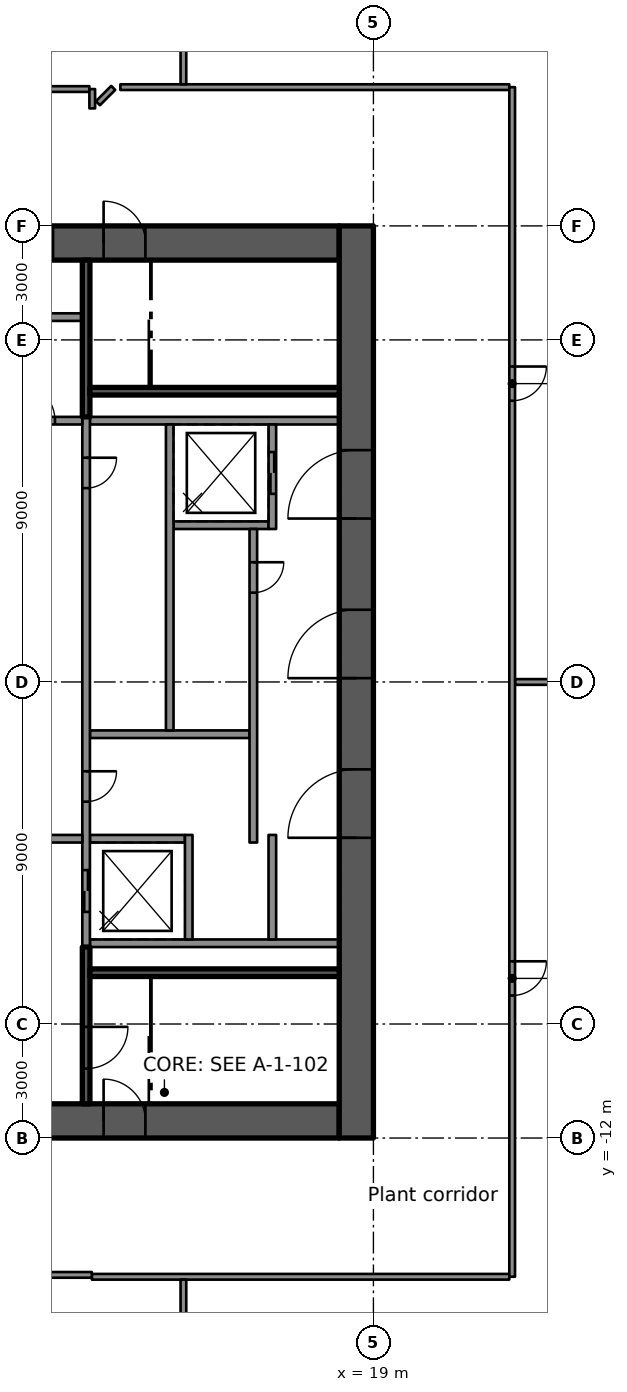
"""IFC4 building model, lengths in metres.
Left out: names, types, materials, properties, quantities, classifications, styles, units other than length and angle.
Written with IfcOpenShell. Run it as: python <this file> out.ifc"""

import sys

from ifc_helpers import new_model, si_unit, direction, frame, frame_2d, origin, place, context, subcontext, project, spatial, rectangle, extrude, element, fill, save


model = new_model("IFC4")
c1 = context("Model", 3, precision=1e-05, world=origin(), true_north=direction((0.0, 1.0)))
c2 = subcontext(c1, "Body", "Model", "MODEL_VIEW")
j1 = project(units=[si_unit("LENGTHUNIT", "METRE"), si_unit("PLANEANGLEUNIT", "RADIAN")], contexts=[c1])
p1 = place(None, origin())
s1 = spatial("IfcSite", under=j1, at=p1, CompositionType="ELEMENT")
p2 = place(p1, origin())
s2 = spatial("IfcBuilding", under=s1, at=p2, CompositionType="ELEMENT")
p3 = place(p2, frame((0.0, 0.0, 299.9)))
s3 = spatial("IfcBuildingStorey", under=s2, at=p3, CompositionType="ELEMENT", Elevation=299.9)
p4 = place(p3, frame((8.9, 11.55, 0.0), z_axis=(0.0, 0.0, 1.0), x_axis=(1.0, 0.0, 0.0)))
e1 = element("IfcWall", 1, at=p4, inside=s3, PredefinedType="SHEAR", context=c2, shape_type="SweptSolid", body=[
    extrude(rectangle(XDim=9.2, YDim=0.9, at=frame_2d((4.6, 0.0))), origin(), (0.0, 0.0, 1.0), 4.4),
])
p5 = place(p4, frame((3.0, 0.0, 0.0)))
e2 = element("IfcOpeningElement", 2, at=p5, cuts=e1, PredefinedType="OPENING", context=c2, shape_type="SweptSolid", body=[
    extrude(rectangle(XDim=1.1, YDim=2.1, at=frame_2d((0.55, 1.05))), frame((0.0, 0.46, 0.0), z_axis=(0.0, -1.0, 0.0), x_axis=(1.0, 0.0, 0.0)), (0.0, 0.0, 1.0), 0.92),
])
p6 = place(p4, frame((0.77, 0.0, 0.0)))
e3 = element("IfcOpeningElement", 3, at=p6, cuts=e1, PredefinedType="OPENING", context=c2, shape_type="SweptSolid", body=[
    extrude(rectangle(XDim=0.9, YDim=2.1, at=frame_2d((0.45, 1.05))), frame((0.0, 0.46, 0.0), z_axis=(0.0, -1.0, 0.0), x_axis=(1.0, 0.0, 0.0)), (0.0, 0.0, 1.0), 0.92),
])
p7 = place(p3, frame((8.9, -11.55, 0.0), z_axis=(0.0, 0.0, 1.0), x_axis=(1.0, 0.0, 0.0)))
e4 = element("IfcWall", 4, at=p7, inside=s3, PredefinedType="SHEAR", context=c2, shape_type="SweptSolid", body=[
    extrude(rectangle(XDim=9.2, YDim=0.9, at=frame_2d((4.6, 0.0))), origin(), (0.0, 0.0, 1.0), 4.4),
])
p8 = place(p7, frame((3.0, 0.0, 0.0)))
e5 = element("IfcOpeningElement", 5, at=p8, cuts=e4, PredefinedType="OPENING", context=c2, shape_type="SweptSolid", body=[
    extrude(rectangle(XDim=1.1, YDim=2.1, at=frame_2d((0.55, 1.05))), frame((0.0, 0.46, 0.0), z_axis=(0.0, -1.0, 0.0), x_axis=(1.0, 0.0, 0.0)), (0.0, 0.0, 1.0), 0.92),
])
p9 = place(p3, frame((18.55, -12.0, 0.0), z_axis=(0.0, 0.0, 1.0), x_axis=(0.0, 1.0, 0.0)))
e6 = element("IfcWall", 6, at=p9, inside=s3, PredefinedType="SHEAR", context=c2, shape_type="SweptSolid", body=[
    extrude(rectangle(XDim=24.0, YDim=0.9, at=frame_2d((12.0, 0.0))), origin(), (0.0, 0.0, 1.0), 4.4),
])
p10 = place(p9, frame((16.3, 0.0, 0.0)))
e7 = element("IfcOpeningElement", 7, at=p10, cuts=e6, PredefinedType="OPENING", context=c2, shape_type="SweptSolid", body=[
    extrude(rectangle(XDim=1.8, YDim=2.1, at=frame_2d((0.9, 1.05))), frame((0.0, 0.46, 0.0), z_axis=(0.0, -1.0, 0.0), x_axis=(1.0, 0.0, 0.0)), (0.0, 0.0, 1.0), 0.92),
])
p11 = place(p9, frame((12.1, 0.0, 0.0)))
e8 = element("IfcOpeningElement", 8, at=p11, cuts=e6, PredefinedType="OPENING", context=c2, shape_type="SweptSolid", body=[
    extrude(rectangle(XDim=1.8, YDim=2.1, at=frame_2d((0.9, 1.05))), frame((0.0, 0.46, 0.0), z_axis=(0.0, -1.0, 0.0), x_axis=(1.0, 0.0, 0.0)), (0.0, 0.0, 1.0), 0.92),
])
p12 = place(p9, frame((7.9, 0.0, 0.0)))
e9 = element("IfcOpeningElement", 9, at=p12, cuts=e6, PredefinedType="OPENING", context=c2, shape_type="SweptSolid", body=[
    extrude(rectangle(XDim=1.8, YDim=2.1, at=frame_2d((0.9, 1.05))), frame((0.0, 0.46, 0.0), z_axis=(0.0, -1.0, 0.0), x_axis=(1.0, 0.0, 0.0)), (0.0, 0.0, 1.0), 0.92),
])
for number, where, z_axis, x_axis in (
    (10, (11.54, -6.875, 0.0), (0.0, 0.0, 1.0), (1.0, 0.0, 0.0)),
    (11, (11.54, 6.875, 0.0), (0.0, 0.0, 1.0), (1.0, 0.0, 0.0)),
):
    element("IfcWall", number, at=place(p3, frame(where, z_axis=z_axis, x_axis=x_axis)), inside=s3, PredefinedType="SOLIDWALL", context=c2, shape_type="SweptSolid", body=[
        extrude(rectangle(XDim=6.56, YDim=0.2, at=frame_2d((3.28, 0.0))), origin(), (0.0, 0.0, 1.0), 3.98),
    ])
p13 = place(p3, frame((13.74, 4.125, 0.0), z_axis=(0.0, 0.0, 1.0), x_axis=(1.0, 0.0, 0.0)))
e12 = element("IfcWall", 12, at=p13, inside=s3, PredefinedType="SOLIDWALL", context=c2, shape_type="SweptSolid", body=[
    extrude(rectangle(XDim=2.5, YDim=0.2, at=frame_2d((1.25, 0.0))), origin(), (0.0, 0.0, 1.0), 3.98),
])
p14 = place(p3, frame((11.54, -1.375, 0.0), z_axis=(0.0, 0.0, 1.0), x_axis=(1.0, 0.0, 0.0)))
e13 = element("IfcWall", 13, at=p14, inside=s3, PredefinedType="SOLIDWALL", context=c2, shape_type="SweptSolid", body=[
    extrude(rectangle(XDim=4.2, YDim=0.2, at=frame_2d((2.1, 0.0))), origin(), (0.0, 0.0, 1.0), 3.98),
])
p15 = place(p3, frame((11.54, -4.125, 0.0), z_axis=(0.0, 0.0, 1.0), x_axis=(1.0, 0.0, 0.0)))
e14 = element("IfcWall", 14, at=p15, inside=s3, PredefinedType="SOLIDWALL", context=c2, shape_type="SweptSolid", body=[
    extrude(rectangle(XDim=2.5, YDim=0.2, at=frame_2d((1.25, 0.0))), origin(), (0.0, 0.0, 1.0), 3.98),
])
p16 = place(p3, frame((11.44, 6.975, 0.0), z_axis=(0.0, 0.0, 1.0), x_axis=(0.0, -1.0, 0.0)))
e15 = element("IfcWall", 15, at=p16, inside=s3, PredefinedType="SOLIDWALL", context=c2, shape_type="SweptSolid", body=[
    extrude(rectangle(XDim=13.95, YDim=0.2, at=frame_2d((6.975, 0.0))), origin(), (0.0, 0.0, 1.0), 3.98),
])
p17 = place(p16, frame((11.925, 0.0, 0.0)))
e16 = element("IfcOpeningElement", 16, at=p17, cuts=e15, PredefinedType="OPENING", context=c2, shape_type="SweptSolid", body=[
    extrude(rectangle(XDim=1.1, YDim=2.1, at=frame_2d((0.55, 1.05))), frame((0.0, 0.11, 0.0), z_axis=(0.0, -1.0, 0.0), x_axis=(1.0, 0.0, 0.0)), (0.0, 0.0, 1.0), 0.22),
])
p18 = place(p16, frame((1.075, 0.0, 0.0)))
e17 = element("IfcOpeningElement", 17, at=p18, cuts=e15, PredefinedType="OPENING", context=c2, shape_type="SweptSolid", body=[
    extrude(rectangle(XDim=0.8, YDim=2.1, at=frame_2d((0.4, 1.05))), frame((0.0, 0.11, 0.0), z_axis=(0.0, -1.0, 0.0), x_axis=(1.0, 0.0, 0.0)), (0.0, 0.0, 1.0), 0.22),
])
p19 = place(p16, frame((9.325, 0.0, 0.0)))
e18 = element("IfcOpeningElement", 18, at=p19, cuts=e15, PredefinedType="OPENING", context=c2, shape_type="SweptSolid", body=[
    extrude(rectangle(XDim=0.8, YDim=2.1, at=frame_2d((0.4, 1.05))), frame((0.0, 0.11, 0.0), z_axis=(0.0, -1.0, 0.0), x_axis=(1.0, 0.0, 0.0)), (0.0, 0.0, 1.0), 0.22),
])
p20 = place(p3, frame((13.64, 6.775, 0.0), z_axis=(0.0, 0.0, 1.0), x_axis=(0.0, -1.0, 0.0)))
e19 = element("IfcWall", 19, at=p20, inside=s3, PredefinedType="SOLIDWALL", context=c2, shape_type="SweptSolid", body=[
    extrude(rectangle(XDim=8.05, YDim=0.2, at=frame_2d((4.025, 0.0))), origin(), (0.0, 0.0, 1.0), 3.98),
])
p21 = place(p3, frame((14.14, -4.025, 0.0), z_axis=(0.0, 0.0, 1.0), x_axis=(0.0, -1.0, 0.0)))
e20 = element("IfcWall", 20, at=p21, inside=s3, PredefinedType="SOLIDWALL", context=c2, shape_type="SweptSolid", body=[
    extrude(rectangle(XDim=2.75, YDim=0.2, at=frame_2d((1.375, 0.0))), origin(), (0.0, 0.0, 1.0), 3.98),
])
p22 = place(p3, frame((16.34, 6.775, 0.0), z_axis=(0.0, 0.0, 1.0), x_axis=(0.0, -1.0, 0.0)))
e21 = element("IfcWall", 21, at=p22, inside=s3, PredefinedType="SOLIDWALL", context=c2, shape_type="SweptSolid", body=[
    extrude(rectangle(XDim=2.75, YDim=0.2, at=frame_2d((1.375, 0.0))), origin(), (0.0, 0.0, 1.0), 3.98),
])
p23 = place(p22, frame((0.725, 0.0, 0.0)))
e22 = element("IfcOpeningElement", 22, at=p23, cuts=e21, PredefinedType="OPENING", context=c2, shape_type="SweptSolid", body=[
    extrude(rectangle(XDim=1.1, YDim=2.1, at=frame_2d((0.55, 1.05))), frame((0.0, 0.11, 0.0), z_axis=(0.0, -1.0, 0.0), x_axis=(1.0, 0.0, 0.0)), (0.0, 0.0, 1.0), 0.22),
])
p24 = place(p3, frame((15.84, 4.025, 0.0), z_axis=(0.0, 0.0, 1.0), x_axis=(0.0, -1.0, 0.0)))
e23 = element("IfcWall", 23, at=p24, inside=s3, PredefinedType="SOLIDWALL", context=c2, shape_type="SweptSolid", body=[
    extrude(rectangle(XDim=8.25, YDim=0.2, at=frame_2d((4.125, 0.0))), origin(), (0.0, 0.0, 1.0), 3.98),
])
p25 = place(p24, frame((0.875, 0.0, 0.0)))
e24 = element("IfcOpeningElement", 24, at=p25, cuts=e23, PredefinedType="OPENING", context=c2, shape_type="SweptSolid", body=[
    extrude(rectangle(XDim=0.8, YDim=2.1, at=frame_2d((0.4, 1.05))), frame((0.0, 0.11, 0.0), z_axis=(0.0, -1.0, 0.0), x_axis=(1.0, 0.0, 0.0)), (0.0, 0.0, 1.0), 0.22),
])
p26 = place(p3, frame((16.34, -4.025, 0.0), z_axis=(0.0, 0.0, 1.0), x_axis=(0.0, -1.0, 0.0)))
e25 = element("IfcWall", 25, at=p26, inside=s3, PredefinedType="SOLIDWALL", context=c2, shape_type="SweptSolid", body=[
    extrude(rectangle(XDim=2.75, YDim=0.2, at=frame_2d((1.375, 0.0))), origin(), (0.0, 0.0, 1.0), 3.98),
])
p27 = place(p3, frame((11.44, -6.975, 0.0), z_axis=(0.0, 0.0, 1.0), x_axis=(0.0, -1.0, 0.0)))
e26 = element("IfcWall", 26, at=p27, inside=s3, PredefinedType="SOLIDWALL", context=c2, shape_type="SweptSolid", body=[
    extrude(rectangle(XDim=4.125, YDim=0.2, at=frame_2d((2.062, 0.0))), origin(), (0.0, 0.0, 1.0), 3.98),
])
p28 = place(p27, frame((2.1, 0.0, 0.0)))
e27 = element("IfcOpeningElement", 27, at=p28, cuts=e26, PredefinedType="OPENING", context=c2, shape_type="SweptSolid", body=[
    extrude(rectangle(XDim=1.1, YDim=2.1, at=frame_2d((0.55, 1.05))), frame((0.0, 0.11, 0.0), z_axis=(0.0, -1.0, 0.0), x_axis=(1.0, 0.0, 0.0)), (0.0, 0.0, 1.0), 0.22),
])
p29 = place(p3, frame((11.54, -7.65, 0.0), z_axis=(0.0, 0.0, 1.0), x_axis=(1.0, 0.0, 0.0)))
e28 = element("IfcWall", 28, at=p29, inside=s3, PredefinedType="SOLIDWALL", context=c2, shape_type="SweptSolid", body=[
    extrude(rectangle(XDim=6.56, YDim=0.2, at=frame_2d((3.28, 0.0))), origin(), (0.0, 0.0, 1.0), 3.98),
])
p30 = place(p3, frame((11.44, 11.1, 0.0), z_axis=(0.0, 0.0, 1.0), x_axis=(0.0, -1.0, 0.0)))
e29 = element("IfcWall", 29, at=p30, inside=s3, PredefinedType="SOLIDWALL", context=c2, shape_type="SweptSolid", body=[
    extrude(rectangle(XDim=4.125, YDim=0.2, at=frame_2d((2.062, 0.0))), origin(), (0.0, 0.0, 1.0), 3.98),
])
p31 = place(p3, frame((11.54, 7.65, 0.0), z_axis=(0.0, 0.0, 1.0), x_axis=(1.0, 0.0, 0.0)))
e30 = element("IfcWall", 30, at=p31, inside=s3, PredefinedType="SOLIDWALL", context=c2, shape_type="SweptSolid", body=[
    extrude(rectangle(XDim=6.56, YDim=0.2, at=frame_2d((3.28, 0.0))), origin(), (0.0, 0.0, 1.0), 3.98),
])
p32 = place(p3, frame((8.9, -4.125, 0.0), z_axis=(0.0, 0.0, 1.0), x_axis=(1.0, 0.0, 0.0)))
e31 = element("IfcWall", 31, at=p32, inside=s3, PredefinedType="PARTITIONING", context=c2, shape_type="SweptSolid", body=[
    extrude(rectangle(XDim=2.44, YDim=0.2, at=frame_2d((1.22, 0.0))), origin(), (0.0, 0.0, 1.0), 3.98),
])
p33 = place(p3, frame((8.9, 6.875, 0.0), z_axis=(0.0, 0.0, 1.0), x_axis=(1.0, 0.0, 0.0)))
e32 = element("IfcWall", 32, at=p33, inside=s3, PredefinedType="PARTITIONING", context=c2, shape_type="SweptSolid", body=[
    extrude(rectangle(XDim=2.44, YDim=0.2, at=frame_2d((1.22, 0.0))), origin(), (0.0, 0.0, 1.0), 3.98),
])
p34 = place(p33, frame((0.72, 0.0, 0.0)))
e33 = element("IfcOpeningElement", 33, at=p34, cuts=e32, PredefinedType="OPENING", context=c2, shape_type="SweptSolid", body=[
    extrude(rectangle(XDim=1.0, YDim=2.1, at=frame_2d((0.5, 1.05))), frame((0.0, 0.11, 0.0), z_axis=(0.0, -1.0, 0.0), x_axis=(1.0, 0.0, 0.0)), (0.0, 0.0, 1.0), 0.22),
])
p35 = place(p3, frame((8.9, 9.6, 0.0), z_axis=(0.0, 0.0, 1.0), x_axis=(1.0, 0.0, 0.0)))
e34 = element("IfcWall", 34, at=p35, inside=s3, PredefinedType="PARTITIONING", context=c2, shape_type="SweptSolid", body=[
    extrude(rectangle(XDim=2.44, YDim=0.2, at=frame_2d((1.22, 0.0))), origin(), (0.0, 0.0, 1.0), 3.98),
])
p36 = place(p3, frame((11.591, -15.651, 0.0), z_axis=(0.0, 0.0, 1.0), x_axis=(1.0, 0.0, 0.0)))
e35 = element("IfcWall", 35, at=p36, inside=s3, PredefinedType="PARTITIONING", context=c2, shape_type="SweptSolid", body=[
    extrude(rectangle(XDim=10.984, YDim=0.15, at=frame_2d((5.492, 0.0))), origin(), (0.0, 0.0, 1.0), 3.98),
])
p37 = place(p3, frame((4.425, -15.6, 0.0), z_axis=(0.0, 0.0, 1.0), x_axis=(0.999999990712, -0.000136295487, 0.0)))
e36 = element("IfcWall", 36, at=p37, inside=s3, PredefinedType="PARTITIONING", context=c2, shape_type="SweptSolid", body=[
    extrude(rectangle(XDim=7.165, YDim=0.15, at=frame_2d((3.583, 0.0))), origin(), (0.0, 0.0, 1.0), 3.98),
])
p38 = place(p3, frame((22.726, 0.0, 0.0), z_axis=(0.0, 0.0, 1.0), x_axis=(1.0, 0.0, 0.0)))
e37 = element("IfcWall", 37, at=p38, inside=s3, PredefinedType="PARTITIONING", context=c2, shape_type="SweptSolid", body=[
    extrude(rectangle(XDim=9.901, YDim=0.15, at=frame_2d((4.95, 0.0))), origin(), (0.0, 0.0, 1.0), 3.98),
])
p39 = place(p3, frame((4.425, 15.601, 0.0), z_axis=(0.0, 0.0, 1.0), x_axis=(1.0, 0.0, 0.0)))
e38 = element("IfcWall", 38, at=p39, inside=s3, PredefinedType="PARTITIONING", context=c2, shape_type="SweptSolid", body=[
    extrude(rectangle(XDim=7.1, YDim=0.15, at=frame_2d((3.55, 0.0))), origin(), (0.0, 0.0, 1.0), 3.98),
])
p40 = place(p39, frame((3.025, 0.0, 0.0)))
e39 = element("IfcOpeningElement", 39, at=p40, cuts=e38, PredefinedType="OPENING", context=c2, shape_type="SweptSolid", body=[
    extrude(rectangle(XDim=0.9, YDim=2.1, at=frame_2d((0.45, 1.05))), frame((0.0, 0.085, 0.0), z_axis=(0.0, -1.0, 0.0), x_axis=(1.0, 0.0, 0.0)), (0.0, 0.0, 1.0), 0.17),
])
p41 = place(p3, frame((12.341, 15.651, 0.0), z_axis=(0.0, 0.0, 1.0), x_axis=(1.0, 0.0, 0.0)))
e40 = element("IfcWall", 40, at=p41, inside=s3, PredefinedType="PARTITIONING", context=c2, shape_type="SweptSolid", body=[
    extrude(rectangle(XDim=10.234, YDim=0.15, at=frame_2d((5.117, 0.0))), origin(), (0.0, 0.0, 1.0), 3.98),
])
p42 = place(p3, frame((11.75, 15.228, 0.0), z_axis=(0.0, 0.0, 1.0), x_axis=(0.707106781187, 0.707106781187, 0.0)))
e41 = element("IfcWall", 41, at=p42, inside=s3, PredefinedType="PARTITIONING", context=c2, shape_type="SweptSolid", body=[
    extrude(rectangle(XDim=0.57, YDim=0.15, at=frame_2d((0.285, 0.0))), origin(), (0.0, 0.0, 1.0), 3.98),
])
p43 = place(p3, frame((22.651, 15.65, 0.0), z_axis=(0.0, 0.0, 1.0), x_axis=(0.0, -1.0, 0.0)))
e42 = element("IfcWall", 42, at=p43, inside=s3, PredefinedType="PARTITIONING", context=c2, shape_type="SweptSolid", body=[
    extrude(rectangle(XDim=31.3, YDim=0.15, at=frame_2d((15.65, 0.0))), origin(), (0.0, 0.0, 1.0), 3.98),
])
p44 = place(p43, frame((23.0, 0.0, 0.0)))
e43 = element("IfcOpeningElement", 43, at=p44, cuts=e42, PredefinedType="OPENING", context=c2, shape_type="SweptSolid", body=[
    extrude(rectangle(XDim=0.9, YDim=2.1, at=frame_2d((0.45, 1.05))), frame((0.0, 0.085, 0.0), z_axis=(0.0, -1.0, 0.0), x_axis=(1.0, 0.0, 0.0)), (0.0, 0.0, 1.0), 0.17),
])
p45 = place(p43, frame((7.35, 0.0, 0.0)))
e44 = element("IfcOpeningElement", 44, at=p45, cuts=e42, PredefinedType="OPENING", context=c2, shape_type="SweptSolid", body=[
    extrude(rectangle(XDim=0.9, YDim=2.1, at=frame_2d((0.45, 1.05))), frame((0.0, 0.085, 0.0), z_axis=(0.0, -1.0, 0.0), x_axis=(1.0, 0.0, 0.0)), (0.0, 0.0, 1.0), 0.17),
])
p46 = place(p3, frame((14.0, -26.92, 0.0), z_axis=(0.0, 0.0, 1.0), x_axis=(0.0, 1.0, 0.0)))
e45 = element("IfcWall", 45, at=p46, inside=s3, PredefinedType="PARTITIONING", context=c2, shape_type="SweptSolid", body=[
    extrude(rectangle(XDim=11.194, YDim=0.15, at=frame_2d((5.597, 0.0))), origin(), (0.0, 0.0, 1.0), 3.98),
])
p47 = place(p3, frame((14.0, 15.726, 0.0), z_axis=(0.0, 0.0, 1.0), x_axis=(0.0, 1.0, 0.0)))
e46 = element("IfcWall", 46, at=p47, inside=s3, PredefinedType="PARTITIONING", context=c2, shape_type="SweptSolid", body=[
    extrude(rectangle(XDim=11.244, YDim=0.15, at=frame_2d((5.622, 0.0))), origin(), (0.0, 0.0, 1.0), 3.98),
])
p48 = place(p3, frame((11.601, 15.092, 0.0), z_axis=(0.0, 0.0, 1.0), x_axis=(0.0, 1.0, 0.0)))
e47 = element("IfcWall", 47, at=p48, inside=s3, PredefinedType="PARTITIONING", context=c2, shape_type="SweptSolid", body=[
    extrude(rectangle(XDim=0.508, YDim=0.15, at=frame_2d((0.254, 0.0))), origin(), (0.0, 0.0, 1.0), 3.98),
])
p49 = place(p23, origin())
e48 = element("IfcDoor", 48, at=p49, inside=s3, OperationType="DOUBLE_DOOR_SLIDING", PredefinedType="DOOR", context=c2, shape_type="SweptSolid", body=[
    extrude(rectangle(XDim=1.1, YDim=2.1, at=frame_2d((0.55, 1.05))), frame((0.0, 0.025, 0.0), z_axis=(0.0, -1.0, 0.0), x_axis=(1.0, 0.0, 0.0)), (0.0, 0.0, 1.0), 0.05),
])
fill(e22, e48)
p50 = place(p17, origin())
e49 = element("IfcDoor", 49, at=p50, inside=s3, OperationType="DOUBLE_DOOR_SLIDING", PredefinedType="DOOR", context=c2, shape_type="SweptSolid", body=[
    extrude(rectangle(XDim=1.1, YDim=2.1, at=frame_2d((0.55, 1.05))), frame((0.0, 0.025, 0.0), z_axis=(0.0, -1.0, 0.0), x_axis=(1.0, 0.0, 0.0)), (0.0, 0.0, 1.0), 0.05),
])
fill(e16, e49)
p51 = place(p18, origin())
e50 = element("IfcDoor", 50, at=p51, inside=s3, OperationType="SINGLE_SWING_LEFT", PredefinedType="DOOR", context=c2, shape_type="SweptSolid", body=[
    extrude(rectangle(XDim=0.8, YDim=2.1, at=frame_2d((0.4, 1.05))), frame((0.0, 0.025, 0.0), z_axis=(0.0, -1.0, 0.0), x_axis=(1.0, 0.0, 0.0)), (0.0, 0.0, 1.0), 0.05),
])
fill(e17, e50)
p52 = place(p25, origin())
e51 = element("IfcDoor", 51, at=p52, inside=s3, OperationType="SINGLE_SWING_LEFT", PredefinedType="DOOR", context=c2, shape_type="SweptSolid", body=[
    extrude(rectangle(XDim=0.8, YDim=2.1, at=frame_2d((0.4, 1.05))), frame((0.0, 0.025, 0.0), z_axis=(0.0, -1.0, 0.0), x_axis=(1.0, 0.0, 0.0)), (0.0, 0.0, 1.0), 0.05),
])
fill(e24, e51)
p53 = place(p19, origin())
e52 = element("IfcDoor", 52, at=p53, inside=s3, OperationType="SINGLE_SWING_LEFT", PredefinedType="DOOR", context=c2, shape_type="SweptSolid", body=[
    extrude(rectangle(XDim=0.8, YDim=2.1, at=frame_2d((0.4, 1.05))), frame((0.0, 0.025, 0.0), z_axis=(0.0, -1.0, 0.0), x_axis=(1.0, 0.0, 0.0)), (0.0, 0.0, 1.0), 0.05),
])
fill(e18, e52)
p54 = place(p10, origin())
e53 = element("IfcDoor", 53, at=p54, inside=s3, OperationType="SINGLE_SWING_RIGHT", PredefinedType="DOOR", context=c2, shape_type="SweptSolid", body=[
    extrude(rectangle(XDim=1.8, YDim=2.1, at=frame_2d((0.9, 1.05))), frame((0.0, 0.025, 0.0), z_axis=(0.0, -1.0, 0.0), x_axis=(1.0, 0.0, 0.0)), (0.0, 0.0, 1.0), 0.05),
])
fill(e7, e53)
p55 = place(p11, origin())
e54 = element("IfcDoor", 54, at=p55, inside=s3, OperationType="SINGLE_SWING_RIGHT", PredefinedType="DOOR", context=c2, shape_type="SweptSolid", body=[
    extrude(rectangle(XDim=1.8, YDim=2.1, at=frame_2d((0.9, 1.05))), frame((0.0, 0.025, 0.0), z_axis=(0.0, -1.0, 0.0), x_axis=(1.0, 0.0, 0.0)), (0.0, 0.0, 1.0), 0.05),
])
fill(e8, e54)
p56 = place(p12, origin())
e55 = element("IfcDoor", 55, at=p56, inside=s3, OperationType="SINGLE_SWING_LEFT", PredefinedType="DOOR", context=c2, shape_type="SweptSolid", body=[
    extrude(rectangle(XDim=1.8, YDim=2.1, at=frame_2d((0.9, 1.05))), frame((0.0, 0.025, 0.0), z_axis=(0.0, -1.0, 0.0), x_axis=(1.0, 0.0, 0.0)), (0.0, 0.0, 1.0), 0.05),
])
fill(e9, e55)
p57 = place(p8, origin())
e56 = element("IfcDoor", 56, at=p57, inside=s3, OperationType="SINGLE_SWING_LEFT", PredefinedType="DOOR", context=c2, shape_type="SweptSolid", body=[
    extrude(rectangle(XDim=1.1, YDim=2.1, at=frame_2d((0.55, 1.05))), frame((0.0, 0.025, 0.0), z_axis=(0.0, -1.0, 0.0), x_axis=(1.0, 0.0, 0.0)), (0.0, 0.0, 1.0), 0.05),
])
fill(e5, e56)
p58 = place(p5, origin())
e57 = element("IfcDoor", 57, at=p58, inside=s3, OperationType="SINGLE_SWING_LEFT", PredefinedType="DOOR", context=c2, shape_type="SweptSolid", body=[
    extrude(rectangle(XDim=1.1, YDim=2.1, at=frame_2d((0.55, 1.05))), frame((0.0, 0.025, 0.0), z_axis=(0.0, -1.0, 0.0), x_axis=(1.0, 0.0, 0.0)), (0.0, 0.0, 1.0), 0.05),
])
fill(e2, e57)
p59 = place(p28, origin())
e58 = element("IfcDoor", 58, at=p59, inside=s3, OperationType="SINGLE_SWING_RIGHT", PredefinedType="DOOR", context=c2, shape_type="SweptSolid", body=[
    extrude(rectangle(XDim=1.1, YDim=2.1, at=frame_2d((0.55, 1.05))), frame((0.0, 0.025, 0.0), z_axis=(0.0, -1.0, 0.0), x_axis=(1.0, 0.0, 0.0)), (0.0, 0.0, 1.0), 0.05),
])
fill(e27, e58)
p60 = place(p6, origin())
e59 = element("IfcDoor", 59, at=p60, inside=s3, OperationType="SINGLE_SWING_LEFT", PredefinedType="DOOR", context=c2, shape_type="SweptSolid", body=[
    extrude(rectangle(XDim=0.9, YDim=2.1, at=frame_2d((0.45, 1.05))), frame((0.0, 0.025, 0.0), z_axis=(0.0, -1.0, 0.0), x_axis=(1.0, 0.0, 0.0)), (0.0, 0.0, 1.0), 0.05),
])
fill(e3, e59)
p61 = place(p34, origin())
e60 = element("IfcDoor", 60, at=p61, inside=s3, OperationType="SINGLE_SWING_RIGHT", PredefinedType="DOOR", context=c2, shape_type="SweptSolid", body=[
    extrude(rectangle(XDim=1.0, YDim=2.1, at=frame_2d((0.5, 1.05))), frame((0.0, 0.025, 0.0), z_axis=(0.0, -1.0, 0.0), x_axis=(1.0, 0.0, 0.0)), (0.0, 0.0, 1.0), 0.05),
])
fill(e33, e60)
p62 = place(p44, origin())
e61 = element("IfcDoor", 61, at=p62, inside=s3, OperationType="SINGLE_SWING_RIGHT", PredefinedType="DOOR", context=c2, shape_type="SweptSolid", body=[
    extrude(rectangle(XDim=0.9, YDim=2.1, at=frame_2d((0.45, 1.05))), frame((0.0, 0.025, 0.0), z_axis=(0.0, -1.0, 0.0), x_axis=(1.0, 0.0, 0.0)), (0.0, 0.0, 1.0), 0.05),
])
fill(e43, e61)
p63 = place(p45, origin())
e62 = element("IfcDoor", 62, at=p63, inside=s3, OperationType="SINGLE_SWING_LEFT", PredefinedType="DOOR", context=c2, shape_type="SweptSolid", body=[
    extrude(rectangle(XDim=0.9, YDim=2.1, at=frame_2d((0.45, 1.05))), frame((0.0, 0.025, 0.0), z_axis=(0.0, -1.0, 0.0), x_axis=(1.0, 0.0, 0.0)), (0.0, 0.0, 1.0), 0.05),
])
fill(e44, e62)
save(model, sys.argv[1])
